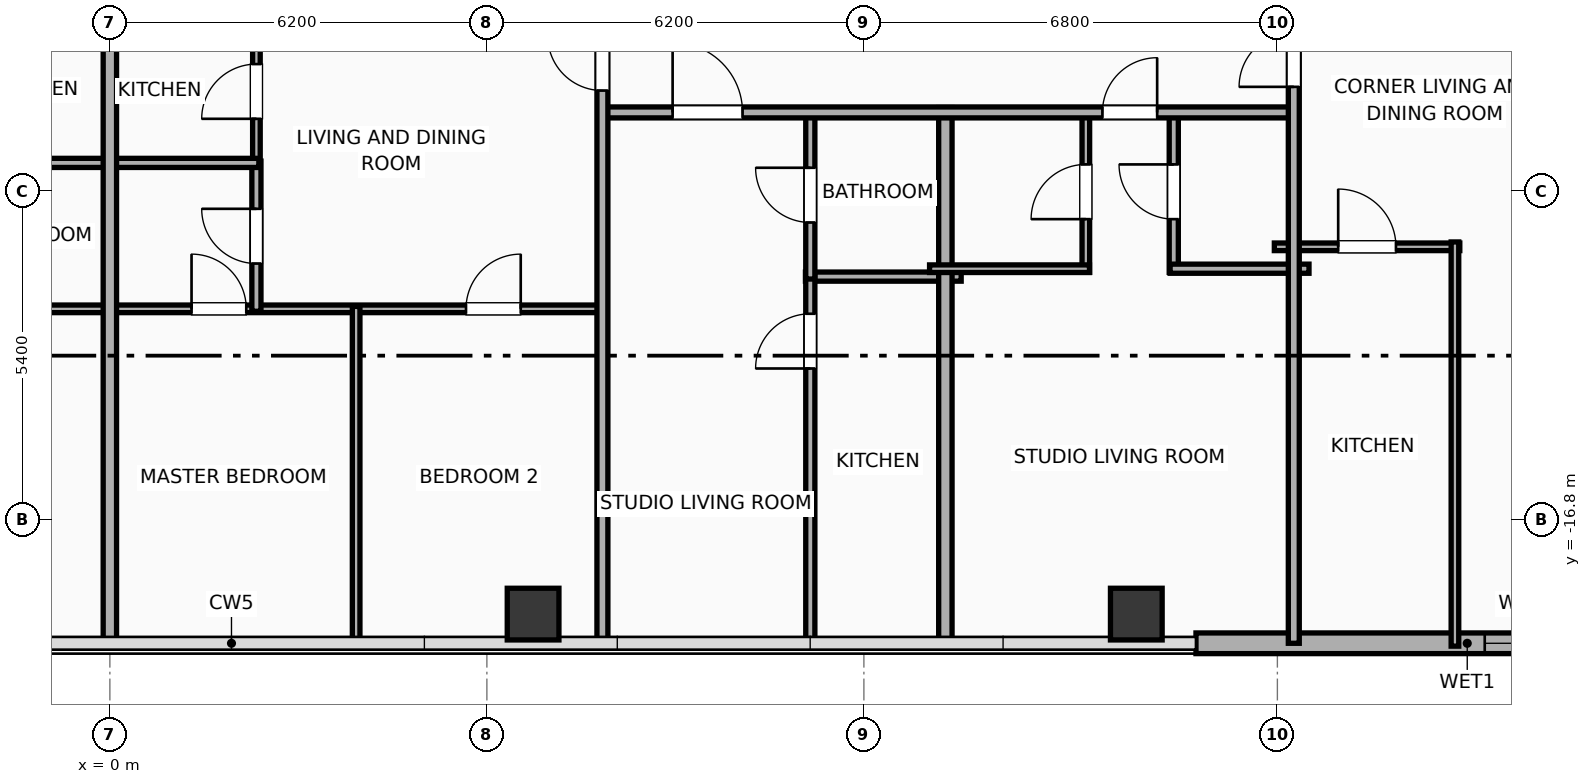
"""IFC4 building model, lengths in metres.
Left out: names, types, materials, properties, quantities, classifications, styles, units other than length and angle.
Written with IfcOpenShell. Run it as: python <this file> out.ifc"""

import sys

from ifc_helpers import new_model, si_unit, direction, frame, frame_2d, origin, origin_2d, place, context, subcontext, project, spatial, rectangle, hollow_rectangle, extrude, element, fill, save


model = new_model("IFC4")
c1 = context("Model", 3, precision=1e-05, world=origin(), true_north=direction((0.0, 1.0)))
c2 = subcontext(c1, "Body", "Model", "MODEL_VIEW")
j1 = project(units=[si_unit("LENGTHUNIT", "METRE"), si_unit("PLANEANGLEUNIT", "RADIAN")], contexts=[c1])
p1 = place(None, origin())
s1 = spatial("IfcSite", under=j1, at=p1, CompositionType="ELEMENT")
p2 = place(p1, origin())
s2 = spatial("IfcBuilding", under=s1, at=p2, CompositionType="ELEMENT")
p3 = place(p2, frame((0.0, 0.0, 200.2)))
s3 = spatial("IfcBuildingStorey", under=s2, at=p3, CompositionType="ELEMENT", Elevation=200.2)
for number, where, z_axis, x_axis in (
    (1, (6.96, -18.35, 0.0), (0.0, 0.0, 1.0), (1.0, 0.0, 0.0)),
    (2, (16.88, -18.35, 0.0), (0.0, 0.0, 1.0), (1.0, 0.0, 0.0)),
):
    element("IfcColumn", number, at=place(p3, frame(where, z_axis=z_axis, x_axis=x_axis)), inside=s3, PredefinedType="COLUMN", context=c2, shape_type="SweptSolid", body=[
        extrude(hollow_rectangle(XDim=0.85, YDim=0.85, WallThickness=0.028, at=origin_2d()), origin(), (0.0, 0.0, 1.0), 3.9),
    ])
p4 = place(p3, frame((26.783, -18.83, 0.0), z_axis=(0.0, 0.0, 1.0), x_axis=(-1.0, 0.0, 0.0)))
e3 = element("IfcWall", 3, at=p4, inside=s3, PredefinedType="ELEMENTEDWALL", context=c2, shape_type="SweptSolid", body=[
    extrude(rectangle(XDim=8.922, YDim=0.34, at=frame_2d((4.461, 0.0))), origin(), (0.0, 0.0, 1.0), 2.54),
])
p5 = place(p4, frame((2.973, 0.0, 0.75)))
e4 = element("IfcOpeningElement", 4, at=p5, cuts=e3, PredefinedType="OPENING", context=c2, shape_type="SweptSolid", body=[
    extrude(rectangle(XDim=1.2, YDim=1.63, at=frame_2d((0.6, 0.815))), frame((0.0, 0.18, 0.0), z_axis=(0.0, -1.0, 0.0), x_axis=(1.0, 0.0, 0.0)), (0.0, 0.0, 1.0), 0.36),
])
p6 = place(p4, frame((1.087, 0.0, 0.75)))
e5 = element("IfcOpeningElement", 5, at=p6, cuts=e3, PredefinedType="OPENING", context=c2, shape_type="SweptSolid", body=[
    extrude(rectangle(XDim=1.2, YDim=1.63, at=frame_2d((0.6, 0.815))), frame((0.0, 0.18, 0.0), z_axis=(0.0, -1.0, 0.0), x_axis=(1.0, 0.0, 0.0)), (0.0, 0.0, 1.0), 0.36),
])
p7 = place(p3, frame((11.439, -12.8, 0.0), z_axis=(0.0, 0.0, 1.0), x_axis=(1.0, 0.0, 0.0)))
e6 = element("IfcWall", 6, at=p7, inside=s3, PredefinedType="PLUMBINGWALL", context=c2, shape_type="SweptSolid", body=[
    extrude(rectangle(XDim=2.561, YDim=0.15, at=frame_2d((1.281, 0.0))), origin(), (0.0, 0.0, 1.0), 3.65),
])
p8 = place(p3, frame((11.519, -18.877, 0.0), z_axis=(0.0, 0.0, 1.0), x_axis=(0.0, 1.0, 0.0)))
e7 = element("IfcWall", 7, at=p8, inside=s3, PredefinedType="PLUMBINGWALL", context=c2, shape_type="SweptSolid", body=[
    extrude(rectangle(XDim=6.117, YDim=0.15, at=frame_2d((3.058, 0.0))), origin(), (0.0, 0.0, 1.0), 3.65),
])
p9 = place(p8, frame((4.566, 0.0, 0.0)))
e8 = element("IfcOpeningElement", 8, at=p9, cuts=e7, PredefinedType="OPENING", context=c2, shape_type="SweptSolid", body=[
    extrude(rectangle(XDim=0.9, YDim=2.05, at=frame_2d((0.45, 1.025))), frame((0.0, 0.085, 0.0), z_axis=(0.0, -1.0, 0.0), x_axis=(1.0, 0.0, 0.0)), (0.0, 0.0, 1.0), 0.17),
])
p10 = place(p3, frame((11.519, -12.84, 0.0), z_axis=(0.0, 0.0, 1.0), x_axis=(0.0, 1.0, 0.0)))
e9 = element("IfcWall", 9, at=p10, inside=s3, PredefinedType="PLUMBINGWALL", context=c2, shape_type="SweptSolid", body=[
    extrude(rectangle(XDim=2.76, YDim=0.15, at=frame_2d((1.38, 0.0))), origin(), (0.0, 0.0, 1.0), 3.65),
])
p11 = place(p10, frame((0.93, 0.0, 0.0)))
e10 = element("IfcOpeningElement", 10, at=p11, cuts=e9, PredefinedType="OPENING", context=c2, shape_type="SweptSolid", body=[
    extrude(rectangle(XDim=0.9, YDim=2.05, at=frame_2d((0.45, 1.025))), frame((0.0, 0.085, 0.0), z_axis=(0.0, -1.0, 0.0), x_axis=(1.0, 0.0, 0.0)), (0.0, 0.0, 1.0), 0.17),
])
p12 = place(p3, frame((13.74, -18.83, 0.0), z_axis=(0.0, 0.0, 1.0), x_axis=(0.0, 1.0, 0.0)))
e11 = element("IfcWall", 11, at=p12, inside=s3, PredefinedType="PARTITIONING", context=c2, shape_type="SweptSolid", body=[
    extrude(rectangle(XDim=8.81, YDim=0.22, at=frame_2d((4.405, 0.0))), origin(), (0.0, 0.0, 1.0), 3.65),
])
p13 = place(p3, frame((16.05, -12.73, 0.0), z_axis=(0.0, 0.0, 1.0), x_axis=(0.0, 1.0, 0.0)))
e12 = element("IfcWall", 12, at=p13, inside=s3, PredefinedType="PARTITIONING", context=c2, shape_type="SweptSolid", body=[
    extrude(rectangle(XDim=2.65, YDim=0.125, at=frame_2d((1.325, 0.0))), origin(), (0.0, 0.0, 1.0), 2.54),
])
p14 = place(p13, frame((0.875, 0.0, 0.0)))
e13 = element("IfcOpeningElement", 13, at=p14, cuts=e12, PredefinedType="OPENING", context=c2, shape_type="SweptSolid", body=[
    extrude(rectangle(XDim=0.9, YDim=2.05, at=frame_2d((0.45, 1.025))), frame((0.0, 0.073, 0.0), z_axis=(0.0, -1.0, 0.0), x_axis=(1.0, 0.0, 0.0)), (0.0, 0.0, 1.0), 0.145),
])
p15 = place(p3, frame((17.496, -12.73, 0.0), z_axis=(0.0, 0.0, 1.0), x_axis=(0.0, 1.0, 0.0)))
e14 = element("IfcWall", 14, at=p15, inside=s3, PredefinedType="PLUMBINGWALL", context=c2, shape_type="SweptSolid", body=[
    extrude(rectangle(XDim=2.65, YDim=0.15, at=frame_2d((1.325, 0.0))), origin(), (0.0, 0.0, 1.0), 3.65),
])
p16 = place(p15, frame((0.875, 0.0, 0.0)))
e15 = element("IfcOpeningElement", 15, at=p16, cuts=e14, PredefinedType="OPENING", context=c2, shape_type="SweptSolid", body=[
    extrude(rectangle(XDim=0.9, YDim=2.05, at=frame_2d((0.45, 1.025))), frame((0.0, 0.085, 0.0), z_axis=(0.0, -1.0, 0.0), x_axis=(1.0, 0.0, 0.0)), (0.0, 0.0, 1.0), 0.17),
])
p17 = place(p3, frame((13.48, -12.67, 0.0), z_axis=(0.0, 0.0, 1.0), x_axis=(1.0, 0.0, 0.0)))
e16 = element("IfcWall", 16, at=p17, inside=s3, PredefinedType="PARTITIONING", context=c2, shape_type="SweptSolid", body=[
    extrude(rectangle(XDim=2.63, YDim=0.125, at=frame_2d((1.315, 0.0))), origin(), (0.0, 0.0, 1.0), 3.65),
])
p18 = place(p3, frame((17.436, -12.67, 0.0), z_axis=(0.0, 0.0, 1.0), x_axis=(1.0, 0.0, 0.0)))
e17 = element("IfcWall", 17, at=p18, inside=s3, PredefinedType="PLUMBINGWALL", context=c2, shape_type="SweptSolid", body=[
    extrude(rectangle(XDim=2.284, YDim=0.15, at=frame_2d((1.142, 0.0))), origin(), (0.0, 0.0, 1.0), 3.65),
])
p19 = place(p3, frame((8.08, -10.1, 0.0), z_axis=(0.0, 0.0, 1.0), x_axis=(1.0, 0.0, 0.0)))
e18 = element("IfcWall", 18, at=p19, inside=s3, PredefinedType="PARTITIONING", context=c2, shape_type="SweptSolid", body=[
    extrude(rectangle(XDim=11.42, YDim=0.18, at=frame_2d((5.71, 0.0))), origin(), (0.0, 0.0, 1.0), 3.65),
])
p20 = place(p19, frame((1.175, 0.0, 0.0)))
e19 = element("IfcOpeningElement", 19, at=p20, cuts=e18, PredefinedType="OPENING", context=c2, shape_type="SweptSolid", body=[
    extrude(rectangle(XDim=1.15, YDim=2.05, at=frame_2d((0.575, 1.025))), frame((0.0, 0.1, 0.0), z_axis=(0.0, -1.0, 0.0), x_axis=(1.0, 0.0, 0.0)), (0.0, 0.0, 1.0), 0.2),
])
p21 = place(p19, frame((8.243, 0.0, 0.0)))
e20 = element("IfcOpeningElement", 20, at=p21, cuts=e18, PredefinedType="OPENING", context=c2, shape_type="SweptSolid", body=[
    extrude(rectangle(XDim=0.9, YDim=2.05, at=frame_2d((0.45, 1.025))), frame((0.0, 0.1, 0.0), z_axis=(0.0, -1.0, 0.0), x_axis=(1.0, 0.0, 0.0)), (0.0, 0.0, 1.0), 0.2),
])
p22 = place(p3, frame((-8.08, -13.33, 0.0), z_axis=(0.0, 0.0, 1.0), x_axis=(1.0, 0.0, 0.0)))
e21 = element("IfcWall", 21, at=p22, inside=s3, PredefinedType="PARTITIONING", context=c2, shape_type="SweptSolid", body=[
    extrude(rectangle(XDim=8.06, YDim=0.125, at=frame_2d((4.03, 0.0))), origin(), (0.0, 0.0, 1.0), 3.65),
])
p23 = place(p22, frame((1.323, 0.0, 0.0)))
e22 = element("IfcOpeningElement", 22, at=p23, cuts=e21, PredefinedType="OPENING", context=c2, shape_type="SweptSolid", body=[
    extrude(rectangle(XDim=0.9, YDim=2.05, at=frame_2d((0.45, 1.025))), frame((0.0, 0.073, 0.0), z_axis=(0.0, -1.0, 0.0), x_axis=(1.0, 0.0, 0.0)), (0.0, 0.0, 1.0), 0.145),
])
p24 = place(p22, frame((4.547, 0.0, 0.0)))
e23 = element("IfcOpeningElement", 23, at=p24, cuts=e21, PredefinedType="OPENING", context=c2, shape_type="SweptSolid", body=[
    extrude(rectangle(XDim=0.9, YDim=2.05, at=frame_2d((0.45, 1.025))), frame((0.0, 0.073, 0.0), z_axis=(0.0, -1.0, 0.0), x_axis=(1.0, 0.0, 0.0)), (0.0, 0.0, 1.0), 0.145),
])
p25 = place(p3, frame((-2.45, -10.93, 0.0), z_axis=(0.0, 0.0, 1.0), x_axis=(1.0, 0.0, 0.0)))
e24 = element("IfcWall", 24, at=p25, inside=s3, PredefinedType="PLUMBINGWALL", context=c2, shape_type="SweptSolid", body=[
    extrude(rectangle(XDim=2.43, YDim=0.15, at=frame_2d((1.215, 0.0))), origin(), (0.0, 0.0, 1.0), 3.65),
])
p26 = place(p3, frame((0.02, -13.33, 0.0), z_axis=(0.0, 0.0, 1.0), x_axis=(1.0, 0.0, 0.0)))
e25 = element("IfcWall", 25, at=p26, inside=s3, PredefinedType="PARTITIONING", context=c2, shape_type="SweptSolid", body=[
    extrude(rectangle(XDim=8.06, YDim=0.125, at=frame_2d((4.03, 0.0))), origin(), (0.0, 0.0, 1.0), 3.65),
])
p27 = place(p26, frame((1.323, 0.0, 0.0)))
e26 = element("IfcOpeningElement", 26, at=p27, cuts=e25, PredefinedType="OPENING", context=c2, shape_type="SweptSolid", body=[
    extrude(rectangle(XDim=0.9, YDim=2.05, at=frame_2d((0.45, 1.025))), frame((0.0, 0.073, 0.0), z_axis=(0.0, -1.0, 0.0), x_axis=(1.0, 0.0, 0.0)), (0.0, 0.0, 1.0), 0.145),
])
p28 = place(p26, frame((5.837, 0.0, 0.0)))
e27 = element("IfcOpeningElement", 27, at=p28, cuts=e25, PredefinedType="OPENING", context=c2, shape_type="SweptSolid", body=[
    extrude(rectangle(XDim=0.9, YDim=2.05, at=frame_2d((0.45, 1.025))), frame((0.0, 0.073, 0.0), z_axis=(0.0, -1.0, 0.0), x_axis=(1.0, 0.0, 0.0)), (0.0, 0.0, 1.0), 0.145),
])
p29 = place(p3, frame((2.41, -10.96, 0.0), z_axis=(0.0, 0.0, 1.0), x_axis=(0.0, 1.0, 0.0)))
e28 = element("IfcWall", 28, at=p29, inside=s3, PredefinedType="PARTITIONING", context=c2, shape_type="SweptSolid", body=[
    extrude(rectangle(XDim=2.41, YDim=0.125, at=frame_2d((1.205, 0.0))), origin(), (0.0, 0.0, 1.0), 3.65),
])
p30 = place(p29, frame((0.755, 0.0, 0.0)))
e29 = element("IfcOpeningElement", 29, at=p30, cuts=e28, PredefinedType="OPENING", context=c2, shape_type="SweptSolid", body=[
    extrude(rectangle(XDim=0.9, YDim=2.05, at=frame_2d((0.45, 1.025))), frame((0.0, 0.073, 0.0), z_axis=(0.0, -1.0, 0.0), x_axis=(1.0, 0.0, 0.0)), (0.0, 0.0, 1.0), 0.145),
])
p31 = place(p3, frame((2.41, -13.37, 0.0), z_axis=(0.0, 0.0, 1.0), x_axis=(0.0, 1.0, 0.0)))
e30 = element("IfcWall", 30, at=p31, inside=s3, PredefinedType="PLUMBINGWALL", context=c2, shape_type="SweptSolid", body=[
    extrude(rectangle(XDim=2.47, YDim=0.15, at=frame_2d((1.235, 0.0))), origin(), (0.0, 0.0, 1.0), 3.65),
])
p32 = place(p31, frame((0.785, 0.0, 0.0)))
e31 = element("IfcOpeningElement", 31, at=p32, cuts=e30, PredefinedType="OPENING", context=c2, shape_type="SweptSolid", body=[
    extrude(rectangle(XDim=0.9, YDim=2.05, at=frame_2d((0.45, 1.025))), frame((0.0, 0.085, 0.0), z_axis=(0.0, -1.0, 0.0), x_axis=(1.0, 0.0, 0.0)), (0.0, 0.0, 1.0), 0.17),
])
p33 = place(p3, frame((0.02, -10.93, 0.0), z_axis=(0.0, 0.0, 1.0), x_axis=(1.0, 0.0, 0.0)))
e32 = element("IfcWall", 32, at=p33, inside=s3, PredefinedType="PLUMBINGWALL", context=c2, shape_type="SweptSolid", body=[
    extrude(rectangle(XDim=2.43, YDim=0.15, at=frame_2d((1.215, 0.0))), origin(), (0.0, 0.0, 1.0), 3.65),
])
p34 = place(p3, frame((4.05, -18.83, 0.0), z_axis=(0.0, 0.0, 1.0), x_axis=(0.0, 1.0, 0.0)))
e33 = element("IfcWall", 33, at=p34, inside=s3, PredefinedType="PARTITIONING", context=c2, shape_type="SweptSolid", body=[
    extrude(rectangle(XDim=5.54, YDim=0.125, at=frame_2d((2.77, 0.0))), origin(), (0.0, 0.0, 1.0), 3.65),
])
p35 = place(p3, frame((8.1, -18.83, 0.0), z_axis=(0.0, 0.0, 1.0), x_axis=(0.0, 1.0, 0.0)))
e34 = element("IfcWall", 34, at=p35, inside=s3, PredefinedType="PARTITIONING", context=c2, shape_type="SweptSolid", body=[
    extrude(rectangle(XDim=10.34, YDim=0.18, at=frame_2d((5.17, 0.0))), origin(), (0.0, 0.0, 1.0), 3.65),
])
p36 = place(p35, frame((9.09, 0.0, 0.0)))
e35 = element("IfcOpeningElement", 35, at=p36, cuts=e34, PredefinedType="OPENING", context=c2, shape_type="SweptSolid", body=[
    extrude(rectangle(XDim=0.9, YDim=2.05, at=frame_2d((0.45, 1.025))), frame((0.0, 0.1, 0.0), z_axis=(0.0, -1.0, 0.0), x_axis=(1.0, 0.0, 0.0)), (0.0, 0.0, 1.0), 0.2),
])
p37 = place(p3, frame((0.0, -18.83, 0.0), z_axis=(0.0, 0.0, 1.0), x_axis=(0.0, 1.0, 0.0)))
e36 = element("IfcWall", 36, at=p37, inside=s3, PredefinedType="PARTITIONING", context=c2, shape_type="SweptSolid", body=[
    extrude(rectangle(XDim=10.34, YDim=0.22, at=frame_2d((5.17, 0.0))), origin(), (0.0, 0.0, 1.0), 3.65),
])
p38 = place(p3, frame((19.15, -12.31, 0.0), z_axis=(0.0, 0.0, 1.0), x_axis=(1.0, 0.0, 0.0)))
e37 = element("IfcWall", 37, at=p38, inside=s3, PredefinedType="PARTITIONING", context=c2, shape_type="SweptSolid", body=[
    extrude(rectangle(XDim=3.05, YDim=0.125, at=frame_2d((1.525, 0.0))), origin(), (0.0, 0.0, 1.0), 3.65),
])
p39 = place(p38, frame((1.05, 0.0, 0.0)))
e38 = element("IfcOpeningElement", 38, at=p39, cuts=e37, PredefinedType="OPENING", context=c2, shape_type="SweptSolid", body=[
    extrude(rectangle(XDim=0.95, YDim=2.05, at=frame_2d((0.475, 1.025))), frame((0.0, 0.073, 0.0), z_axis=(0.0, -1.0, 0.0), x_axis=(1.0, 0.0, 0.0)), (0.0, 0.0, 1.0), 0.145),
])
p40 = place(p3, frame((22.12, -18.877, 0.0), z_axis=(0.0, 0.0, 1.0), x_axis=(0.0, 1.0, 0.0)))
e39 = element("IfcWall", 39, at=p40, inside=s3, PredefinedType="PARTITIONING", context=c2, shape_type="SweptSolid", body=[
    extrude(rectangle(XDim=6.647, YDim=0.125, at=frame_2d((3.323, 0.0))), origin(), (0.0, 0.0, 1.0), 3.65),
])
p41 = place(p3, frame((19.47, -18.83, 0.0), z_axis=(0.0, 0.0, 1.0), x_axis=(0.0, 1.0, 0.0)))
e40 = element("IfcWall", 40, at=p41, inside=s3, PredefinedType="PARTITIONING", context=c2, shape_type="SweptSolid", body=[
    extrude(rectangle(XDim=17.23, YDim=0.18, at=frame_2d((8.615, 0.0))), origin(), (0.0, 0.0, 1.0), 3.65),
])
p42 = place(p41, frame((9.151, 0.0, 0.0)))
e41 = element("IfcOpeningElement", 41, at=p42, cuts=e40, PredefinedType="OPENING", context=c2, shape_type="SweptSolid", body=[
    extrude(rectangle(XDim=0.9, YDim=2.05, at=frame_2d((0.45, 1.025))), frame((0.0, 0.1, 0.0), z_axis=(0.0, -1.0, 0.0), x_axis=(1.0, 0.0, 0.0)), (0.0, 0.0, 1.0), 0.2),
])
p43 = place(p5, origin())
e42 = element("IfcWindow", 42, at=p43, inside=s3, PartitioningType="SINGLE_PANEL", PredefinedType="WINDOW", context=c2, shape_type="SweptSolid", body=[
    extrude(rectangle(XDim=1.2, YDim=1.63, at=frame_2d((0.6, 0.815))), frame((0.0, 0.03, 0.0), z_axis=(0.0, -1.0, 0.0), x_axis=(1.0, 0.0, 0.0)), (0.0, 0.0, 1.0), 0.06),
])
fill(e4, e42)
p44 = place(p9, origin())
e43 = element("IfcDoor", 43, at=p44, inside=s3, OperationType="SINGLE_SWING_LEFT", PredefinedType="DOOR", context=c2, shape_type="SweptSolid", body=[
    extrude(rectangle(XDim=0.9, YDim=2.05, at=frame_2d((0.45, 1.025))), frame((0.0, 0.025, 0.0), z_axis=(0.0, -1.0, 0.0), x_axis=(1.0, 0.0, 0.0)), (0.0, 0.0, 1.0), 0.05),
])
fill(e8, e43)
p45 = place(p11, origin())
e44 = element("IfcDoor", 44, at=p45, inside=s3, OperationType="SINGLE_SWING_RIGHT", PredefinedType="DOOR", context=c2, shape_type="SweptSolid", body=[
    extrude(rectangle(XDim=0.9, YDim=2.05, at=frame_2d((0.45, 1.025))), frame((0.0, 0.025, 0.0), z_axis=(0.0, -1.0, 0.0), x_axis=(1.0, 0.0, 0.0)), (0.0, 0.0, 1.0), 0.05),
])
fill(e10, e44)
p46 = place(p14, origin())
e45 = element("IfcDoor", 45, at=p46, inside=s3, OperationType="SINGLE_SWING_LEFT", PredefinedType="DOOR", context=c2, shape_type="SweptSolid", body=[
    extrude(rectangle(XDim=0.9, YDim=2.05, at=frame_2d((0.45, 1.025))), frame((0.0, 0.025, 0.0), z_axis=(0.0, -1.0, 0.0), x_axis=(1.0, 0.0, 0.0)), (0.0, 0.0, 1.0), 0.05),
])
fill(e13, e45)
p47 = place(p16, origin())
e46 = element("IfcDoor", 46, at=p47, inside=s3, OperationType="SINGLE_SWING_RIGHT", PredefinedType="DOOR", context=c2, shape_type="SweptSolid", body=[
    extrude(rectangle(XDim=0.9, YDim=2.05, at=frame_2d((0.45, 1.025))), frame((0.0, 0.025, 0.0), z_axis=(0.0, -1.0, 0.0), x_axis=(1.0, 0.0, 0.0)), (0.0, 0.0, 1.0), 0.05),
])
fill(e15, e46)
p48 = place(p20, origin())
e47 = element("IfcDoor", 47, at=p48, inside=s3, OperationType="SINGLE_SWING_LEFT", PredefinedType="DOOR", context=c2, shape_type="SweptSolid", body=[
    extrude(rectangle(XDim=1.15, YDim=2.05, at=frame_2d((0.575, 1.025))), frame((0.0, 0.025, 0.0), z_axis=(0.0, -1.0, 0.0), x_axis=(1.0, 0.0, 0.0)), (0.0, 0.0, 1.0), 0.05),
])
fill(e19, e47)
p49 = place(p21, origin())
e48 = element("IfcDoor", 48, at=p49, inside=s3, OperationType="SINGLE_SWING_RIGHT", PredefinedType="DOOR", context=c2, shape_type="SweptSolid", body=[
    extrude(rectangle(XDim=0.9, YDim=2.05, at=frame_2d((0.45, 1.025))), frame((0.0, 0.025, 0.0), z_axis=(0.0, -1.0, 0.0), x_axis=(1.0, 0.0, 0.0)), (0.0, 0.0, 1.0), 0.05),
])
fill(e20, e48)
p50 = place(p27, origin())
e49 = element("IfcDoor", 49, at=p50, inside=s3, OperationType="SINGLE_SWING_LEFT", PredefinedType="DOOR", context=c2, shape_type="SweptSolid", body=[
    extrude(rectangle(XDim=0.9, YDim=2.05, at=frame_2d((0.45, 1.025))), frame((0.0, 0.025, 0.0), z_axis=(0.0, -1.0, 0.0), x_axis=(1.0, 0.0, 0.0)), (0.0, 0.0, 1.0), 0.05),
])
fill(e26, e49)
p51 = place(p28, origin())
e50 = element("IfcDoor", 50, at=p51, inside=s3, OperationType="SINGLE_SWING_RIGHT", PredefinedType="DOOR", context=c2, shape_type="SweptSolid", body=[
    extrude(rectangle(XDim=0.9, YDim=2.05, at=frame_2d((0.45, 1.025))), frame((0.0, 0.025, 0.0), z_axis=(0.0, -1.0, 0.0), x_axis=(1.0, 0.0, 0.0)), (0.0, 0.0, 1.0), 0.05),
])
fill(e27, e50)
p52 = place(p30, origin())
e51 = element("IfcDoor", 51, at=p52, inside=s3, OperationType="SINGLE_SWING_LEFT", PredefinedType="DOOR", context=c2, shape_type="SweptSolid", body=[
    extrude(rectangle(XDim=0.9, YDim=2.05, at=frame_2d((0.45, 1.025))), frame((0.0, 0.025, 0.0), z_axis=(0.0, -1.0, 0.0), x_axis=(1.0, 0.0, 0.0)), (0.0, 0.0, 1.0), 0.05),
])
fill(e29, e51)
p53 = place(p32, origin())
e52 = element("IfcDoor", 52, at=p53, inside=s3, OperationType="SINGLE_SWING_RIGHT", PredefinedType="DOOR", context=c2, shape_type="SweptSolid", body=[
    extrude(rectangle(XDim=0.9, YDim=2.05, at=frame_2d((0.45, 1.025))), frame((0.0, 0.025, 0.0), z_axis=(0.0, -1.0, 0.0), x_axis=(1.0, 0.0, 0.0)), (0.0, 0.0, 1.0), 0.05),
])
fill(e31, e52)
p54 = place(p36, origin())
e53 = element("IfcDoor", 53, at=p54, inside=s3, OperationType="SINGLE_SWING_RIGHT", PredefinedType="DOOR", context=c2, shape_type="SweptSolid", body=[
    extrude(rectangle(XDim=0.9, YDim=2.05, at=frame_2d((0.45, 1.025))), frame((0.0, 0.025, 0.0), z_axis=(0.0, -1.0, 0.0), x_axis=(1.0, 0.0, 0.0)), (0.0, 0.0, 1.0), 0.05),
])
fill(e35, e53)
p55 = place(p39, origin())
e54 = element("IfcDoor", 54, at=p55, inside=s3, OperationType="SINGLE_SWING_LEFT", PredefinedType="DOOR", context=c2, shape_type="SweptSolid", body=[
    extrude(rectangle(XDim=0.95, YDim=2.05, at=frame_2d((0.475, 1.025))), frame((0.0, 0.025, 0.0), z_axis=(0.0, -1.0, 0.0), x_axis=(1.0, 0.0, 0.0)), (0.0, 0.0, 1.0), 0.05),
])
fill(e38, e54)
p56 = place(p42, origin())
e55 = element("IfcDoor", 55, at=p56, inside=s3, OperationType="SINGLE_SWING_LEFT", PredefinedType="DOOR", context=c2, shape_type="SweptSolid", body=[
    extrude(rectangle(XDim=0.9, YDim=2.05, at=frame_2d((0.45, 1.025))), frame((0.0, 0.025, 0.0), z_axis=(0.0, -1.0, 0.0), x_axis=(1.0, 0.0, 0.0)), (0.0, 0.0, 1.0), 0.05),
])
fill(e41, e55)
save(model, sys.argv[1])
